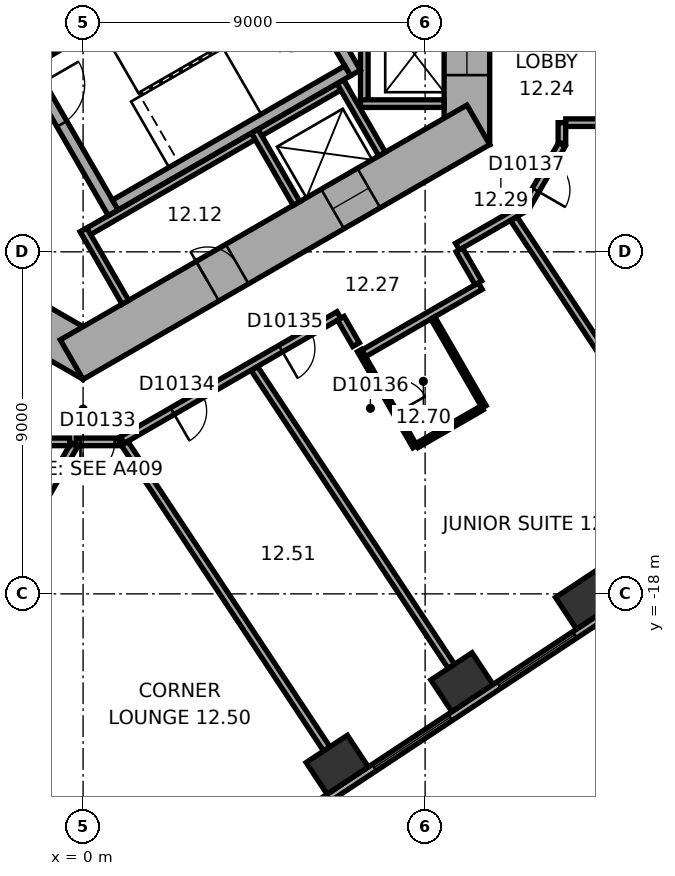
"""IFC4 building model, lengths in metres.
Left out: names, types, materials, properties, quantities, classifications, styles, units other than length and angle.
Written with IfcOpenShell. Run it as: python <this file> out.ifc"""

import sys

from ifc_helpers import new_model, si_unit, direction, frame, frame_2d, origin, origin_2d, place, context, subcontext, project, spatial, rectangle, extrude, element, fill, save


model = new_model("IFC4")
c1 = context("Model", 3, precision=1e-05, world=origin(), true_north=direction((0.0, 1.0)))
c2 = subcontext(c1, "Body", "Model", "MODEL_VIEW")
j1 = project(units=[si_unit("LENGTHUNIT", "METRE"), si_unit("PLANEANGLEUNIT", "RADIAN")], contexts=[c1])
p1 = place(None, origin())
s1 = spatial("IfcSite", under=j1, at=p1, CompositionType="ELEMENT")
p2 = place(p1, origin())
s2 = spatial("IfcBuilding", under=s1, at=p2, CompositionType="ELEMENT")
p3 = place(p2, frame((0.0, 0.0, 60.5)))
s3 = spatial("IfcBuildingStorey", under=s2, at=p3, CompositionType="ELEMENT", Elevation=60.5)
for number, where, z_axis, x_axis in (
    (1, (6.688, -22.496, 0.0), (0.0, 0.0, 1.0), (0.834, 0.552, 0.0)),
    (2, (9.969, -20.324, 0.0), (0.0, 0.0, 1.0), (0.834, 0.552, 0.0)),
    (3, (13.25, -18.152, 0.0), (0.0, 0.0, 1.0), (0.834, 0.552, 0.0)),
):
    element("IfcColumn", number, at=place(p3, frame(where, z_axis=z_axis, x_axis=x_axis)), inside=s3, PredefinedType="COLUMN", context=c2, shape_type="SweptSolid", body=[
        extrude(rectangle(XDim=1.3, YDim=1.0, at=origin_2d()), origin(), (0.0, 0.0, 1.0), 3.3),
    ])
p4 = place(p3, frame((10.1, -6.177, 0.0), z_axis=(0.0, 0.0, 1.0), x_axis=(0.0, 1.0, 0.0)))
e4 = element("IfcWall", 4, at=p4, inside=s3, PredefinedType="SHEAR", context=c2, shape_type="SweptSolid", body=[
    extrude(rectangle(XDim=12.355, YDim=1.2, at=frame_2d((6.177, 0.0))), origin(), (0.0, 0.0, 1.0), 3.3),
])
p5 = place(p4, frame((6.378, 0.0, 0.0)))
e5 = element("IfcOpeningElement", 5, at=p5, cuts=e4, PredefinedType="OPENING", context=c2, shape_type="SweptSolid", body=[
    extrude(rectangle(XDim=1.5, YDim=2.1, at=frame_2d((0.75, 1.05))), frame((0.0, 0.61, 0.0), z_axis=(0.0, -1.0, 0.0), x_axis=(1.0, 0.0, 0.0)), (0.0, 0.0, 1.0), 1.22),
])
p6 = place(p4, frame((1.828, 0.0, 0.0)))
e6 = element("IfcOpeningElement", 6, at=p6, cuts=e4, PredefinedType="OPENING", context=c2, shape_type="SweptSolid", body=[
    extrude(rectangle(XDim=1.1, YDim=2.1, at=frame_2d((0.55, 1.05))), frame((0.0, 0.61, 0.0), z_axis=(0.0, -1.0, 0.0), x_axis=(1.0, 0.0, 0.0)), (0.0, 0.0, 1.0), 1.22),
])
p7 = place(p4, frame((4.427, 0.0, 0.0)))
e7 = element("IfcOpeningElement", 7, at=p7, cuts=e4, PredefinedType="OPENING", context=c2, shape_type="SweptSolid", body=[
    extrude(rectangle(XDim=1.1, YDim=2.1, at=frame_2d((0.55, 1.05))), frame((0.0, 0.61, 0.0), z_axis=(0.0, -1.0, 0.0), x_axis=(1.0, 0.0, 0.0)), (0.0, 0.0, 1.0), 1.22),
])
p8 = place(p3, frame((-10.4, -5.658, 0.0), z_axis=(0.0, 0.0, 1.0), x_axis=(0.866021384402, -0.500006961711, 0.0)))
e8 = element("IfcWall", 8, at=p8, inside=s3, PredefinedType="SHEAR", context=c2, shape_type="SweptSolid", body=[
    extrude(rectangle(XDim=12.355, YDim=1.2, at=frame_2d((6.178, 0.0))), origin(), (0.0, 0.0, 1.0), 3.3),
])
p9 = place(p8, frame((6.378, 0.0, 0.0)))
e9 = element("IfcOpeningElement", 9, at=p9, cuts=e8, PredefinedType="OPENING", context=c2, shape_type="SweptSolid", body=[
    extrude(rectangle(XDim=1.5, YDim=2.1, at=frame_2d((0.75, 1.05))), frame((0.0, 0.61, 0.0), z_axis=(0.0, -1.0, 0.0), x_axis=(1.0, 0.0, 0.0)), (0.0, 0.0, 1.0), 1.22),
])
p10 = place(p8, frame((1.928, 0.0, 0.0)))
e10 = element("IfcOpeningElement", 10, at=p10, cuts=e8, PredefinedType="OPENING", context=c2, shape_type="SweptSolid", body=[
    extrude(rectangle(XDim=0.9, YDim=2.1, at=frame_2d((0.45, 1.05))), frame((0.0, 0.61, 0.0), z_axis=(0.0, -1.0, 0.0), x_axis=(1.0, 0.0, 0.0)), (0.0, 0.0, 1.0), 1.22),
])
p11 = place(p8, frame((4.528, 0.0, 0.0)))
e11 = element("IfcOpeningElement", 11, at=p11, cuts=e8, PredefinedType="OPENING", context=c2, shape_type="SweptSolid", body=[
    extrude(rectangle(XDim=0.9, YDim=2.1, at=frame_2d((0.45, 1.05))), frame((0.0, 0.61, 0.0), z_axis=(0.0, -1.0, 0.0), x_axis=(1.0, 0.0, 0.0)), (0.0, 0.0, 1.0), 1.22),
])
p12 = place(p3, frame((-0.3, -11.836, 0.0), z_axis=(0.0, 0.0, 1.0), x_axis=(0.866021384402, 0.500006961711, 0.0)))
e12 = element("IfcWall", 12, at=p12, inside=s3, PredefinedType="SHEAR", context=c2, shape_type="SweptSolid", body=[
    extrude(rectangle(XDim=12.355, YDim=1.2, at=frame_2d((6.178, 0.0))), origin(), (0.0, 0.0, 1.0), 3.3),
])
p13 = place(p12, frame((4.128, 0.0, 0.0)))
e13 = element("IfcOpeningElement", 13, at=p13, cuts=e12, PredefinedType="OPENING", context=c2, shape_type="SweptSolid", body=[
    extrude(rectangle(XDim=0.9, YDim=2.1, at=frame_2d((0.45, 1.05))), frame((0.0, 0.61, 0.0), z_axis=(0.0, -1.0, 0.0), x_axis=(1.0, 0.0, 0.0)), (0.0, 0.0, 1.0), 1.22),
])
p14 = place(p12, frame((7.928, 0.0, 0.0)))
e14 = element("IfcOpeningElement", 14, at=p14, cuts=e12, PredefinedType="OPENING", context=c2, shape_type="SweptSolid", body=[
    extrude(rectangle(XDim=1.1, YDim=2.1, at=frame_2d((0.55, 1.05))), frame((0.0, 0.61, 0.0), z_axis=(0.0, -1.0, 0.0), x_axis=(1.0, 0.0, 0.0)), (0.0, 0.0, 1.0), 1.22),
])
p15 = place(p3, frame((3.083, -25.601, 0.0), z_axis=(0.0, 0.0, 1.0), x_axis=(0.833884295743, 0.551939291329, 0.0)))
e15 = element("IfcWall", 15, at=p15, inside=s3, PredefinedType="STANDARD", context=c2, shape_type="SweptSolid", body=[
    extrude(rectangle(XDim=21.246, YDim=0.2, at=frame_2d((10.623, 0.0))), origin(), (0.0, 0.0, 1.0), 3.3),
])
p16 = place(p15, frame((1.553, 0.0, 0.8)))
e16 = element("IfcOpeningElement", 16, at=p16, cuts=e15, PredefinedType="OPENING", context=c2, shape_type="SweptSolid", body=[
    extrude(rectangle(XDim=2.4, YDim=1.7, at=frame_2d((1.2, 0.85))), frame((0.0, 0.11, 0.0), z_axis=(0.0, -1.0, 0.0), x_axis=(1.0, 0.0, 0.0)), (0.0, 0.0, 1.0), 0.22),
])
p17 = place(p15, frame((5.488, 0.0, 0.8)))
e17 = element("IfcOpeningElement", 17, at=p17, cuts=e15, PredefinedType="OPENING", context=c2, shape_type="SweptSolid", body=[
    extrude(rectangle(XDim=2.4, YDim=1.7, at=frame_2d((1.2, 0.85))), frame((0.0, 0.11, 0.0), z_axis=(0.0, -1.0, 0.0), x_axis=(1.0, 0.0, 0.0)), (0.0, 0.0, 1.0), 0.22),
])
p18 = place(p15, frame((9.422, 0.0, 0.8)))
e18 = element("IfcOpeningElement", 18, at=p18, cuts=e15, PredefinedType="OPENING", context=c2, shape_type="SweptSolid", body=[
    extrude(rectangle(XDim=2.4, YDim=1.7, at=frame_2d((1.2, 0.85))), frame((0.0, 0.11, 0.0), z_axis=(0.0, -1.0, 0.0), x_axis=(1.0, 0.0, 0.0)), (0.0, 0.0, 1.0), 0.22),
])
p19 = place(p15, frame((13.357, 0.0, 0.8)))
e19 = element("IfcOpeningElement", 19, at=p19, cuts=e15, PredefinedType="OPENING", context=c2, shape_type="SweptSolid", body=[
    extrude(rectangle(XDim=2.4, YDim=1.7, at=frame_2d((1.2, 0.85))), frame((0.0, 0.11, 0.0), z_axis=(0.0, -1.0, 0.0), x_axis=(1.0, 0.0, 0.0)), (0.0, 0.0, 1.0), 0.22),
])
p20 = place(p15, frame((17.291, 0.0, 0.8)))
e20 = element("IfcOpeningElement", 20, at=p20, cuts=e15, PredefinedType="OPENING", context=c2, shape_type="SweptSolid", body=[
    extrude(rectangle(XDim=2.4, YDim=1.7, at=frame_2d((1.2, 0.85))), frame((0.0, 0.11, 0.0), z_axis=(0.0, -1.0, 0.0), x_axis=(1.0, 0.0, 0.0)), (0.0, 0.0, 1.0), 0.22),
])
p21 = place(p3, frame((7.4, -5.2, 0.0), z_axis=(0.0, 0.0, 1.0), x_axis=(0.0, 1.0, 0.0)))
e21 = element("IfcWall", 21, at=p21, inside=s3, PredefinedType="PARTITIONING", context=c2, shape_type="SweptSolid", body=[
    extrude(rectangle(XDim=5.4, YDim=0.2, at=frame_2d((2.7, 0.0))), origin(), (0.0, 0.0, 1.0), 3.05),
])
p22 = place(p3, frame((7.3, -5.1, 0.0), z_axis=(0.0, 0.0, 1.0), x_axis=(1.0, 0.0, 0.0)))
e22 = element("IfcWall", 22, at=p22, inside=s3, PredefinedType="PARTITIONING", context=c2, shape_type="SweptSolid", body=[
    extrude(rectangle(XDim=2.2, YDim=0.2, at=frame_2d((1.1, 0.0))), origin(), (0.0, 0.0, 1.0), 3.05),
])
p23 = place(p3, frame((-0.024, -8.559, 0.0), z_axis=(0.0, 0.0, 1.0), x_axis=(0.866026010844, 0.49999894854, 0.0)))
e23 = element("IfcWall", 23, at=p23, inside=s3, PredefinedType="PARTITIONING", context=c2, shape_type="SweptSolid", body=[
    extrude(rectangle(XDim=8.0, YDim=0.2, at=frame_2d((4.0, 0.0))), origin(), (0.0, 0.0, 1.0), 3.05),
])
for number, where, z_axis, x_axis in (
    (24, (0.013, -8.422, 0.0), (0.0, 0.0, 1.0), (0.5, -0.866, 0.0)),
    (25, (4.516, -5.822, 0.0), (0.0, 0.0, 1.0), (0.5, -0.866, 0.0)),
    (26, (6.768, -4.522, 0.0), (0.0, 0.0, 1.0), (0.5, -0.866, 0.0)),
):
    element("IfcWall", number, at=place(p3, frame(where, z_axis=z_axis, x_axis=x_axis)), inside=s3, PredefinedType="PARTITIONING", context=c2, shape_type="SweptSolid", body=[
        extrude(rectangle(XDim=2.2, YDim=0.2, at=frame_2d((1.1, 0.0))), origin(), (0.0, 0.0, 1.0), 3.05),
    ])
p24 = place(p3, frame((-1.558, -3.902, 0.0), z_axis=(0.0, 0.0, 1.0), x_axis=(0.499977259774, -0.866038532462, 0.0)))
e27 = element("IfcWall", 27, at=p24, inside=s3, PredefinedType="SHEAR", context=c2, shape_type="SweptSolid", body=[
    extrude(rectangle(XDim=4.7, YDim=0.3, at=frame_2d((2.35, 0.0))), origin(), (0.0, 0.0, 1.0), 3.05),
])
p25 = place(p24, frame((0.8, 0.0, 0.0)))
e28 = element("IfcOpeningElement", 28, at=p25, cuts=e27, PredefinedType="OPENING", context=c2, shape_type="SweptSolid", body=[
    extrude(rectangle(XDim=1.2, YDim=2.1, at=frame_2d((0.6, 1.05))), frame((0.0, 0.16, 0.0), z_axis=(0.0, -1.0, 0.0), x_axis=(1.0, 0.0, 0.0)), (0.0, 0.0, 1.0), 0.32),
])
p26 = place(p3, frame((4.816, -0.222, 0.0), z_axis=(0.0, 0.0, 1.0), x_axis=(0.499977259774, -0.866038532462, 0.0)))
e29 = element("IfcWall", 29, at=p26, inside=s3, PredefinedType="SHEAR", context=c2, shape_type="SweptSolid", body=[
    extrude(rectangle(XDim=4.7, YDim=0.3, at=frame_2d((2.35, 0.0))), origin(), (0.0, 0.0, 1.0), 3.05),
])
for number, where, z_axis, x_axis in (
    (30, (-1.353, -3.957, 0.0), (0.0, 0.0, 1.0), (0.866, 0.5, 0.0)),
    (31, (0.847, -7.767, 0.0), (0.0, 0.0, 1.0), (0.866, 0.5, 0.0)),
):
    element("IfcWall", number, at=place(p3, frame(where, z_axis=z_axis, x_axis=x_axis)), inside=s3, PredefinedType="SHEAR", context=c2, shape_type="SweptSolid", body=[
        extrude(rectangle(XDim=7.06, YDim=0.3, at=frame_2d((3.53, 0.0))), origin(), (0.0, 0.0, 1.0), 3.05),
    ])
p27 = place(p3, frame((-5.052, -22.429, 0.0), z_axis=(0.0, 0.0, 1.0), x_axis=(0.50000569793, 0.866022114058, 0.0)))
e32 = element("IfcWall", 32, at=p27, inside=s3, PredefinedType="PARTITIONING", context=c2, shape_type="SweptSolid", body=[
    extrude(rectangle(XDim=9.65, YDim=0.2, at=frame_2d((4.825, 0.0))), origin(), (0.0, 0.0, 1.0), 3.05),
])
p28 = place(p3, frame((-0.91, -14.001, 0.0), z_axis=(0.0, 0.0, 1.0), x_axis=(1.0, 0.0, 0.0)))
e33 = element("IfcWall", 33, at=p28, inside=s3, PredefinedType="PARTITIONING", context=c2, shape_type="SweptSolid", body=[
    extrude(rectangle(XDim=0.56, YDim=0.2, at=frame_2d((0.28, 0.0))), origin(), (0.0, 0.0, 1.0), 3.05),
])
p29 = place(p3, frame((-0.186, -14.001, 0.0), z_axis=(0.0, 0.0, 1.0), x_axis=(1.0, 0.0, 0.0)))
e34 = element("IfcWall", 34, at=p29, inside=s3, PredefinedType="PARTITIONING", context=c2, shape_type="SweptSolid", body=[
    extrude(rectangle(XDim=1.136, YDim=0.2, at=frame_2d((0.568, 0.0))), origin(), (0.0, 0.0, 1.0), 3.05),
])
p30 = place(p29, frame((0.118, 0.0, 0.0)))
e35 = element("IfcOpeningElement", 35, at=p30, cuts=e34, PredefinedType="OPENING", context=c2, shape_type="SweptSolid", body=[
    extrude(rectangle(XDim=0.9, YDim=2.1, at=frame_2d((0.45, 1.05))), frame((0.0, 0.11, 0.0), z_axis=(0.0, -1.0, 0.0), x_axis=(1.0, 0.0, 0.0)), (0.0, 0.0, 1.0), 0.22),
])
p31 = place(p3, frame((1.033, -13.953, 0.0), z_axis=(0.0, 0.0, 1.0), x_axis=(0.866017531406, 0.500013635111, 0.0)))
e36 = element("IfcWall", 36, at=p31, inside=s3, PredefinedType="PARTITIONING", context=c2, shape_type="SweptSolid", body=[
    extrude(rectangle(XDim=6.58, YDim=0.2, at=frame_2d((3.29, 0.0))), origin(), (0.0, 0.0, 1.0), 3.05),
])
p32 = place(p31, frame((1.521, 0.0, 0.0)))
e37 = element("IfcOpeningElement", 37, at=p32, cuts=e36, PredefinedType="OPENING", context=c2, shape_type="SweptSolid", body=[
    extrude(rectangle(XDim=0.9, YDim=2.1, at=frame_2d((0.45, 1.05))), frame((0.0, 0.11, 0.0), z_axis=(0.0, -1.0, 0.0), x_axis=(1.0, 0.0, 0.0)), (0.0, 0.0, 1.0), 0.22),
])
p33 = place(p31, frame((4.811, 0.0, 0.0)))
e38 = element("IfcOpeningElement", 38, at=p33, cuts=e36, PredefinedType="OPENING", context=c2, shape_type="SweptSolid", body=[
    extrude(rectangle(XDim=0.9, YDim=2.1, at=frame_2d((0.45, 1.05))), frame((0.0, 0.11, 0.0), z_axis=(0.0, -1.0, 0.0), x_axis=(1.0, 0.0, 0.0)), (0.0, 0.0, 1.0), 0.22),
])
p34 = place(p3, frame((6.412, -22.079, 0.0), z_axis=(0.0, 0.0, 1.0), x_axis=(-0.551919507115, 0.83389739037, 0.0)))
e39 = element("IfcWall", 39, at=p34, inside=s3, PredefinedType="PARTITIONING", context=c2, shape_type="SweptSolid", body=[
    extrude(rectangle(XDim=9.635, YDim=0.2, at=frame_2d((4.817, 0.0))), origin(), (0.0, 0.0, 1.0), 3.05),
])
p35 = place(p3, frame((6.782, -10.749, 0.0), z_axis=(0.0, 0.0, 1.0), x_axis=(0.500170954823, -0.865926680471, 0.0)))
e40 = element("IfcWall", 40, at=p35, inside=s3, PredefinedType="PARTITIONING", context=c2, shape_type="SweptSolid", body=[
    extrude(rectangle(XDim=0.801, YDim=0.2, at=frame_2d((0.4, 0.0))), origin(), (0.0, 0.0, 1.0), 3.05),
])
p36 = place(p3, frame((7.385, -11.673, 0.0), z_axis=(0.0, 0.0, 1.0), x_axis=(0.866037524642, 0.499979005472, 0.0)))
e41 = element("IfcWall", 41, at=p36, inside=s3, PredefinedType="PARTITIONING", context=c2, shape_type="SweptSolid", body=[
    extrude(rectangle(XDim=3.542, YDim=0.2, at=frame_2d((1.771, 0.0))), origin(), (0.0, 0.0, 1.0), 3.05),
])
p37 = place(p3, frame((8.733, -14.127, 0.0), z_axis=(0.0, 0.0, 1.0), x_axis=(-0.499978132246, 0.86603802877, 0.0)))
e42 = element("IfcWall", 42, at=p37, inside=s3, PredefinedType="PARTITIONING", context=c2, shape_type="SweptSolid", body=[
    extrude(rectangle(XDim=2.921, YDim=0.12, at=frame_2d((1.46, 0.0))), origin(), (0.0, 0.0, 1.0), 3.05),
])
p38 = place(p37, frame((1.01, 0.0, 0.0)))
e43 = element("IfcOpeningElement", 43, at=p38, cuts=e42, PredefinedType="OPENING", context=c2, shape_type="SweptSolid", body=[
    extrude(rectangle(XDim=0.9, YDim=2.1, at=frame_2d((0.45, 1.05))), frame((0.0, 0.07, 0.0), z_axis=(0.0, -1.0, 0.0), x_axis=(1.0, 0.0, 0.0)), (0.0, 0.0, 1.0), 0.14),
])
p39 = place(p3, frame((9.203, -10.738, 0.0), z_axis=(0.0, 0.0, 1.0), x_axis=(0.50000943426, -0.866019956843, 0.0)))
e44 = element("IfcWall", 44, at=p39, inside=s3, PredefinedType="PARTITIONING", context=c2, shape_type="SweptSolid", body=[
    extrude(rectangle(XDim=2.7, YDim=0.12, at=frame_2d((1.35, 0.0))), origin(), (0.0, 0.0, 1.0), 3.05),
])
p40 = place(p3, frame((9.693, -19.907, 0.0), z_axis=(0.0, 0.0, 1.0), x_axis=(-0.551938394837, 0.833884889121, 0.0)))
e45 = element("IfcWall", 45, at=p40, inside=s3, PredefinedType="PARTITIONING", context=c2, shape_type="SweptSolid", body=[
    extrude(rectangle(XDim=9.394, YDim=0.2, at=frame_2d((4.697, 0.0))), origin(), (0.0, 0.0, 1.0), 2.6),
])
p41 = place(p3, frame((9.852, -8.861, 0.0), z_axis=(0.0, 0.0, 1.0), x_axis=(0.866013291437, 0.500020978615, 0.0)))
e46 = element("IfcWall", 46, at=p41, inside=s3, PredefinedType="PARTITIONING", context=c2, shape_type="SweptSolid", body=[
    extrude(rectangle(XDim=2.077, YDim=0.2, at=frame_2d((1.038, 0.0))), origin(), (0.0, 0.0, 1.0), 3.05),
])
p42 = place(p3, frame((10.402, -9.815, 0.0), z_axis=(0.0, 0.0, 1.0), x_axis=(-0.499968756647, 0.866043441391, 0.0)))
e47 = element("IfcWall", 47, at=p42, inside=s3, PredefinedType="PARTITIONING", context=c2, shape_type="SweptSolid", body=[
    extrude(rectangle(XDim=1.001, YDim=0.2, at=frame_2d((0.5, 0.0))), origin(), (0.0, 0.0, 1.0), 3.05),
])
p43 = place(p3, frame((10.501, -13.106, 0.0), z_axis=(0.0, 0.0, 1.0), x_axis=(-0.866013262469, -0.500021028785, 0.0)))
e48 = element("IfcWall", 48, at=p43, inside=s3, PredefinedType="PARTITIONING", context=c2, shape_type="SweptSolid", body=[
    extrude(rectangle(XDim=1.982, YDim=0.12, at=frame_2d((0.991, 0.0))), origin(), (0.0, 0.0, 1.0), 3.05),
])
p44 = place(p3, frame((11.67, -7.788, 0.0), z_axis=(0.0, 0.0, 1.0), x_axis=(0.500063286585, 0.865988862174, 0.0)))
e49 = element("IfcWall", 49, at=p44, inside=s3, PredefinedType="PARTITIONING", context=c2, shape_type="SweptSolid", body=[
    extrude(rectangle(XDim=1.86, YDim=0.2, at=frame_2d((0.93, 0.0))), origin(), (0.0, 0.0, 1.0), 3.05),
])
p45 = place(p44, frame((0.48, 0.0, 0.0)))
e50 = element("IfcOpeningElement", 50, at=p45, cuts=e49, PredefinedType="OPENING", context=c2, shape_type="SweptSolid", body=[
    extrude(rectangle(XDim=0.9, YDim=2.1, at=frame_2d((0.45, 1.05))), frame((0.0, 0.11, 0.0), z_axis=(0.0, -1.0, 0.0), x_axis=(1.0, 0.0, 0.0)), (0.0, 0.0, 1.0), 0.22),
])
p46 = place(p3, frame((12.6, -6.138, 0.0), z_axis=(0.0, 0.0, 1.0), x_axis=(0.0, 1.0, 0.0)))
e51 = element("IfcWall", 51, at=p46, inside=s3, PredefinedType="PARTITIONING", context=c2, shape_type="SweptSolid", body=[
    extrude(rectangle(XDim=0.537, YDim=0.2, at=frame_2d((0.268, 0.0))), origin(), (0.0, 0.0, 1.0), 3.05),
])
p47 = place(p3, frame((12.7, -5.601, 0.0), z_axis=(0.0, 0.0, 1.0), x_axis=(1.0, 0.0, 0.0)))
e52 = element("IfcWall", 52, at=p47, inside=s3, PredefinedType="PARTITIONING", context=c2, shape_type="SweptSolid", body=[
    extrude(rectangle(XDim=1.101, YDim=0.2, at=frame_2d((0.551, 0.0))), origin(), (0.0, 0.0, 1.0), 3.05),
])
p48 = place(p3, frame((16.255, -15.564, 0.0), z_axis=(0.0, 0.0, 1.0), x_axis=(-0.55192208744, 0.833895682562, 0.0)))
e53 = element("IfcWall", 53, at=p48, inside=s3, PredefinedType="PARTITIONING", context=c2, shape_type="SweptSolid", body=[
    extrude(rectangle(XDim=8.913, YDim=0.2, at=frame_2d((4.457, 0.0))), origin(), (0.0, 0.0, 1.0), 2.6),
])
p49 = place(p17, origin())
e54 = element("IfcWindow", 54, at=p49, inside=s3, PartitioningType="SINGLE_PANEL", PredefinedType="WINDOW", context=c2, shape_type="SweptSolid", body=[
    extrude(rectangle(XDim=2.4, YDim=1.7, at=frame_2d((1.2, 0.85))), frame((0.0, 0.03, 0.0), z_axis=(0.0, -1.0, 0.0), x_axis=(1.0, 0.0, 0.0)), (0.0, 0.0, 1.0), 0.06),
])
fill(e17, e54)
p50 = place(p18, origin())
e55 = element("IfcWindow", 55, at=p50, inside=s3, PartitioningType="SINGLE_PANEL", PredefinedType="WINDOW", context=c2, shape_type="SweptSolid", body=[
    extrude(rectangle(XDim=2.4, YDim=1.7, at=frame_2d((1.2, 0.85))), frame((0.0, 0.03, 0.0), z_axis=(0.0, -1.0, 0.0), x_axis=(1.0, 0.0, 0.0)), (0.0, 0.0, 1.0), 0.06),
])
fill(e18, e55)
p51 = place(p25, origin())
e56 = element("IfcDoor", 56, at=p51, inside=s3, OperationType="SINGLE_SWING_RIGHT", PredefinedType="DOOR", context=c2, shape_type="SweptSolid", body=[
    extrude(rectangle(XDim=1.2, YDim=2.1, at=frame_2d((0.6, 1.05))), frame((0.0, 0.025, 0.0), z_axis=(0.0, -1.0, 0.0), x_axis=(1.0, 0.0, 0.0)), (0.0, 0.0, 1.0), 0.05),
])
fill(e28, e56)
p52 = place(p13, origin())
e57 = element("IfcDoor", 57, at=p52, inside=s3, OperationType="SINGLE_SWING_LEFT", PredefinedType="DOOR", context=c2, shape_type="SweptSolid", body=[
    extrude(rectangle(XDim=0.9, YDim=2.1, at=frame_2d((0.45, 1.05))), frame((0.0, 0.025, 0.0), z_axis=(0.0, -1.0, 0.0), x_axis=(1.0, 0.0, 0.0)), (0.0, 0.0, 1.0), 0.05),
])
fill(e13, e57)
p53 = place(p6, origin())
e58 = element("IfcDoor", 58, at=p53, inside=s3, OperationType="DOUBLE_DOOR_SLIDING", PredefinedType="DOOR", context=c2, shape_type="SweptSolid", body=[
    extrude(rectangle(XDim=1.1, YDim=2.1, at=frame_2d((0.55, 1.05))), frame((0.0, 0.025, 0.0), z_axis=(0.0, -1.0, 0.0), x_axis=(1.0, 0.0, 0.0)), (0.0, 0.0, 1.0), 0.05),
])
fill(e6, e58)
p54 = place(p14, origin())
e59 = element("IfcDoor", 59, at=p54, inside=s3, OperationType="DOUBLE_DOOR_SLIDING", PredefinedType="DOOR", context=c2, shape_type="SweptSolid", body=[
    extrude(rectangle(XDim=1.1, YDim=2.1, at=frame_2d((0.55, 1.05))), frame((0.0, 0.025, 0.0), z_axis=(0.0, -1.0, 0.0), x_axis=(1.0, 0.0, 0.0)), (0.0, 0.0, 1.0), 0.05),
])
fill(e14, e59)
p55 = place(p30, origin())
e60 = element("IfcDoor", 60, at=p55, inside=s3, OperationType="SINGLE_SWING_LEFT", PredefinedType="DOOR", context=c2, shape_type="SweptSolid", body=[
    extrude(rectangle(XDim=0.9, YDim=2.1, at=frame_2d((0.45, 1.05))), frame((0.0, 0.025, 0.0), z_axis=(0.0, -1.0, 0.0), x_axis=(1.0, 0.0, 0.0)), (0.0, 0.0, 1.0), 0.05),
])
fill(e35, e60)
p56 = place(p32, origin())
e61 = element("IfcDoor", 61, at=p56, inside=s3, OperationType="SINGLE_SWING_LEFT", PredefinedType="DOOR", context=c2, shape_type="SweptSolid", body=[
    extrude(rectangle(XDim=0.9, YDim=2.1, at=frame_2d((0.45, 1.05))), frame((0.0, 0.025, 0.0), z_axis=(0.0, -1.0, 0.0), x_axis=(1.0, 0.0, 0.0)), (0.0, 0.0, 1.0), 0.05),
])
fill(e37, e61)
p57 = place(p33, origin())
e62 = element("IfcDoor", 62, at=p57, inside=s3, OperationType="SINGLE_SWING_LEFT", PredefinedType="DOOR", context=c2, shape_type="SweptSolid", body=[
    extrude(rectangle(XDim=0.9, YDim=2.1, at=frame_2d((0.45, 1.05))), frame((0.0, 0.025, 0.0), z_axis=(0.0, -1.0, 0.0), x_axis=(1.0, 0.0, 0.0)), (0.0, 0.0, 1.0), 0.05),
])
fill(e38, e62)
p58 = place(p38, origin())
e63 = element("IfcDoor", 63, at=p58, inside=s3, OperationType="SINGLE_SWING_LEFT", PredefinedType="DOOR", context=c2, shape_type="SweptSolid", body=[
    extrude(rectangle(XDim=0.9, YDim=2.1, at=frame_2d((0.45, 1.05))), frame((0.0, 0.025, 0.0), z_axis=(0.0, -1.0, 0.0), x_axis=(1.0, 0.0, 0.0)), (0.0, 0.0, 1.0), 0.05),
])
fill(e43, e63)
p59 = place(p45, origin())
e64 = element("IfcDoor", 64, at=p59, inside=s3, OperationType="SINGLE_SWING_LEFT", PredefinedType="DOOR", context=c2, shape_type="SweptSolid", body=[
    extrude(rectangle(XDim=0.9, YDim=2.1, at=frame_2d((0.45, 1.05))), frame((0.0, 0.025, 0.0), z_axis=(0.0, -1.0, 0.0), x_axis=(1.0, 0.0, 0.0)), (0.0, 0.0, 1.0), 0.05),
])
fill(e50, e64)
save(model, sys.argv[1])
